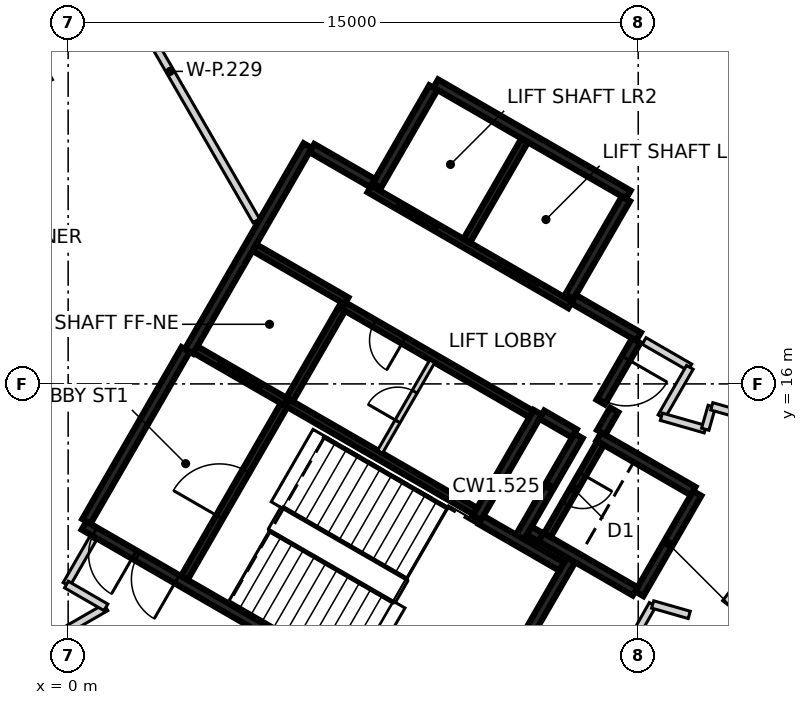
"""IFC4 building model, lengths in metres.
Left out: names, types, materials, properties, quantities, classifications, styles, units other than length and angle.
Written with IfcOpenShell. Run it as: python <this file> out.ifc"""

import sys

from ifc_helpers import new_model, si_unit, direction, frame, frame_2d, origin, place, context, subcontext, project, spatial, rectangle, extrude, element, fill, save


model = new_model("IFC4")
c1 = context("Model", 3, precision=1e-05, world=origin(), true_north=direction((0.0, 1.0)))
c2 = subcontext(c1, "Body", "Model", "MODEL_VIEW")
j1 = project(units=[si_unit("LENGTHUNIT", "METRE"), si_unit("PLANEANGLEUNIT", "RADIAN")], contexts=[c1])
p1 = place(None, origin())
s1 = spatial("IfcSite", under=j1, at=p1, CompositionType="ELEMENT")
p2 = place(p1, origin())
s2 = spatial("IfcBuilding", under=s1, at=p2, CompositionType="ELEMENT")
p3 = place(p2, frame((0.0, 0.0, 60.2)))
s3 = spatial("IfcBuildingStorey", under=s2, at=p3, CompositionType="ELEMENT", Elevation=60.2)
p4 = place(p3, frame((10.42, 6.498, 0.0), z_axis=(0.0, 0.0, 1.0), x_axis=(-0.866021906294, 0.500006057782, 0.0)))
e1 = element("IfcWall", 1, at=p4, inside=s3, PredefinedType="SHEAR", context=c2, shape_type="SweptSolid", body=[
    extrude(rectangle(XDim=11.55, YDim=0.25, at=frame_2d((5.775, 0.0))), origin(), (0.0, 0.0, 1.0), 3.125),
])
p5 = place(p4, frame((10.025, 0.0, 0.0)))
e2 = element("IfcOpeningElement", 2, at=p5, cuts=e1, PredefinedType="OPENING", context=c2, shape_type="SweptSolid", body=[
    extrude(rectangle(XDim=1.2, YDim=2.1, at=frame_2d((0.6, 1.05))), frame((0.0, 0.135, 0.0), z_axis=(0.0, -1.0, 0.0), x_axis=(1.0, 0.0, 0.0)), (0.0, 0.0, 1.0), 0.27),
])
p6 = place(p4, frame((8.725, 0.0, 0.0)))
e3 = element("IfcOpeningElement", 3, at=p6, cuts=e1, PredefinedType="OPENING", context=c2, shape_type="SweptSolid", body=[
    extrude(rectangle(XDim=1.2, YDim=2.1, at=frame_2d((0.6, 1.05))), frame((0.0, 0.135, 0.0), z_axis=(0.0, -1.0, 0.0), x_axis=(1.0, 0.0, 0.0)), (0.0, 0.0, 1.0), 0.27),
])
p7 = place(p3, frame((3.179, 16.856, 0.0), z_axis=(0.0, 0.0, 1.0), x_axis=(0.500004234368, 0.866022959057, 0.0)))
e4 = element("IfcWall", 4, at=p7, inside=s3, PredefinedType="SHEAR", context=c2, shape_type="SweptSolid", body=[
    extrude(rectangle(XDim=6.25, YDim=0.25, at=frame_2d((3.125, 0.0))), origin(), (0.0, 0.0, 1.0), 3.125),
])
p8 = place(p3, frame((9.673, 23.903, 0.0), z_axis=(0.0, 0.0, 1.0), x_axis=(0.86603616409, -0.499981362141, 0.0)))
e5 = element("IfcWall", 5, at=p8, inside=s3, PredefinedType="SHEAR", context=c2, shape_type="SweptSolid", body=[
    extrude(rectangle(XDim=5.85, YDim=0.25, at=frame_2d((2.925, 0.0))), origin(), (0.0, 0.0, 1.0), 3.125),
])
p9 = place(p3, frame((0.48, 12.381, 0.0), z_axis=(0.0, 0.0, 1.0), x_axis=(0.49999885962, 0.866026062182, 0.0)))
e6 = element("IfcWall", 6, at=p9, inside=s3, PredefinedType="SHEAR", context=c2, shape_type="SweptSolid", body=[
    extrude(rectangle(XDim=5.225, YDim=0.25, at=frame_2d((2.612, 0.0))), origin(), (0.0, 0.0, 1.0), 3.125),
])
p10 = place(p3, frame((13.238, 11.378, 0.0), z_axis=(0.0, 0.0, 1.0), x_axis=(-0.500008851346, -0.866020293397, 0.0)))
e7 = element("IfcWall", 7, at=p10, inside=s3, PredefinedType="SHEAR", context=c2, shape_type="SweptSolid", body=[
    extrude(rectangle(XDim=5.51, YDim=0.25, at=frame_2d((2.755, 0.0))), origin(), (0.0, 0.0, 1.0), 3.125),
])
p11 = place(p3, frame((12.357, 15.252, 0.0), z_axis=(0.0, 0.0, 1.0), x_axis=(-0.500028443584, -0.866008981251, 0.0)))
e8 = element("IfcWall", 8, at=p11, inside=s3, PredefinedType="SHEAR", context=c2, shape_type="SweptSolid", body=[
    extrude(rectangle(XDim=3.2, YDim=0.25, at=frame_2d((1.6, 0.0))), origin(), (0.0, 0.0, 1.0), 3.125),
])
for number, where, z_axis, x_axis in (
    (9, (8.123, 21.219, 0.0), (0.0, 0.0, 1.0), (0.5, 0.866, 0.0)),
    (10, (14.676, 20.87, 0.0), (0.0, 0.0, 1.0), (-0.5, -0.866, 0.0)),
):
    element("IfcWall", number, at=place(p3, frame(where, z_axis=z_axis, x_axis=x_axis)), inside=s3, PredefinedType="SHEAR", context=c2, shape_type="SweptSolid", body=[
        extrude(rectangle(XDim=2.975, YDim=0.25, at=frame_2d((1.487, 0.0))), origin(), (0.0, 0.0, 1.0), 3.125),
    ])
p12 = place(p3, frame((16.552, 13.119, 0.0), z_axis=(0.0, 0.0, 1.0), x_axis=(-0.499978833458, -0.866037623948, 0.0)))
e11 = element("IfcWall", 11, at=p12, inside=s3, PredefinedType="SHEAR", context=c2, shape_type="SweptSolid", body=[
    extrude(rectangle(XDim=3.05, YDim=0.25, at=frame_2d((1.525, 0.0))), origin(), (0.0, 0.0, 1.0), 3.125),
])
p13 = place(p3, frame((14.918, 10.54, 0.0), z_axis=(0.0, 0.0, 1.0), x_axis=(-0.866063538972, 0.499933942099, 0.0)))
e12 = element("IfcWall", 12, at=p13, inside=s3, PredefinedType="SHEAR", context=c2, shape_type="SweptSolid", body=[
    extrude(rectangle(XDim=2.865, YDim=0.25, at=frame_2d((1.432, 0.0))), origin(), (0.0, 0.0, 1.0), 3.125),
])
p14 = place(p3, frame((13.963, 14.614, 0.0), z_axis=(0.0, 0.0, 1.0), x_axis=(0.866042235819, -0.499970844928, 0.0)))
e13 = element("IfcWall", 13, at=p14, inside=s3, PredefinedType="SHEAR", context=c2, shape_type="SweptSolid", body=[
    extrude(rectangle(XDim=2.865, YDim=0.25, at=frame_2d((1.432, 0.0))), origin(), (0.0, 0.0, 1.0), 3.125),
])
p15 = place(p3, frame((11.888, 11.961, 0.0), z_axis=(0.0, 0.0, 1.0), x_axis=(0.500003324108, 0.866023484601, 0.0)))
e14 = element("IfcWall", 14, at=p15, inside=s3, PredefinedType="SHEAR", context=c2, shape_type="SweptSolid", body=[
    extrude(rectangle(XDim=3.085, YDim=0.25, at=frame_2d((1.542, 0.0))), origin(), (0.0, 0.0, 1.0), 3.125),
])
p16 = place(p3, frame((10.865, 12.418, 0.0), z_axis=(0.0, 0.0, 1.0), x_axis=(0.866026229868, -0.499998569178, 0.0)))
e15 = element("IfcWall", 15, at=p16, inside=s3, PredefinedType="SHEAR", context=c2, shape_type="SweptSolid", body=[
    extrude(rectangle(XDim=2.449, YDim=0.25, at=frame_2d((1.225, 0.0))), origin(), (0.0, 0.0, 1.0), 3.125),
])
p17 = place(p3, frame((13.297, 18.231, 0.0), z_axis=(0.0, 0.0, 1.0), x_axis=(0.866043531843, -0.499968599967, 0.0)))
e16 = element("IfcWall", 16, at=p17, inside=s3, PredefinedType="SHEAR", context=c2, shape_type="SweptSolid", body=[
    extrude(rectangle(XDim=1.975, YDim=0.25, at=frame_2d((0.987, 0.0))), origin(), (0.0, 0.0, 1.0), 3.125),
])
p18 = place(p3, frame((6.413, 22.206, 0.0), z_axis=(0.0, 0.0, 1.0), x_axis=(0.866016279763, -0.500015802937, 0.0)))
e17 = element("IfcWall", 17, at=p18, inside=s3, PredefinedType="SHEAR", context=c2, shape_type="SweptSolid", body=[
    extrude(rectangle(XDim=1.849, YDim=0.25, at=frame_2d((0.925, 0.0))), origin(), (0.0, 0.0, 1.0), 3.125),
])
p19 = place(p3, frame((14.945, 17.135, 0.0), z_axis=(0.0, 0.0, 1.0), x_axis=(-0.499983108224, -0.866035156036, 0.0)))
e18 = element("IfcWall", 18, at=p19, inside=s3, PredefinedType="SHEAR", context=c2, shape_type="SweptSolid", body=[
    extrude(rectangle(XDim=1.865, YDim=0.25, at=frame_2d((0.932, 0.0))), origin(), (0.0, 0.0, 1.0), 3.125),
])
p20 = place(p19, frame((0.535, 0.0, 0.0)))
e19 = element("IfcOpeningElement", 19, at=p20, cuts=e18, PredefinedType="OPENING", context=c2, shape_type="SweptSolid", body=[
    extrude(rectangle(XDim=1.25, YDim=2.1, at=frame_2d((0.625, 1.05))), frame((0.0, 0.135, 0.0), z_axis=(0.0, -1.0, 0.0), x_axis=(1.0, 0.0, 0.0)), (0.0, 0.0, 1.0), 0.27),
])
p21 = place(p3, frame((13.322, 14.695, 0.0), z_axis=(0.0, 0.0, 1.0), x_axis=(-0.866017078145, 0.500014420154, 0.0)))
e20 = element("IfcWall", 20, at=p21, inside=s3, PredefinedType="SHEAR", context=c2, shape_type="SweptSolid", body=[
    extrude(rectangle(XDim=0.989, YDim=0.25, at=frame_2d((0.495, 0.0))), origin(), (0.0, 0.0, 1.0), 3.125),
])
p22 = place(p3, frame((14.368, 15.315, 0.0), z_axis=(0.0, 0.0, 1.0), x_axis=(-0.499897359611, -0.866084655132, 0.0)))
e21 = element("IfcWall", 21, at=p22, inside=s3, PredefinedType="SHEAR", context=c2, shape_type="SweptSolid", body=[
    extrude(rectangle(XDim=0.685, YDim=0.25, at=frame_2d((0.342, 0.0))), origin(), (0.0, 0.0, 1.0), 3.125),
])
p23 = place(p3, frame((12.433, 11.964, 0.0), z_axis=(0.0, 0.0, 1.0), x_axis=(-0.866055875208, 0.499947218231, 0.0)))
e22 = element("IfcWall", 22, at=p23, inside=s3, PredefinedType="SHEAR", context=c2, shape_type="SweptSolid", body=[
    extrude(rectangle(XDim=0.345, YDim=0.25, at=frame_2d((0.172, 0.0))), origin(), (0.0, 0.0, 1.0), 3.125),
])
p24 = place(p3, frame((13.21, 18.08, 0.0), z_axis=(0.0, 0.0, 1.0), x_axis=(-0.866030299012, 0.499991521122, 0.0)))
e23 = element("IfcWall", 23, at=p24, inside=s3, PredefinedType="SHEAR", context=c2, shape_type="SweptSolid", body=[
    extrude(rectangle(XDim=6.1, YDim=0.2, at=frame_2d((3.05, 0.0))), origin(), (0.0, 0.0, 1.0), 3.125),
])
p25 = place(p24, frame((1.0, 0.0, 0.0)))
e24 = element("IfcOpeningElement", 24, at=p25, cuts=e23, PredefinedType="OPENING", context=c2, shape_type="SweptSolid", body=[
    extrude(rectangle(XDim=1.2, YDim=2.1, at=frame_2d((0.6, 1.05))), frame((0.0, 0.11, 0.0), z_axis=(0.0, -1.0, 0.0), x_axis=(1.0, 0.0, 0.0)), (0.0, 0.0, 1.0), 0.22),
])
p26 = place(p24, frame((4.05, 0.0, 0.0)))
e25 = element("IfcOpeningElement", 25, at=p26, cuts=e23, PredefinedType="OPENING", context=c2, shape_type="SweptSolid", body=[
    extrude(rectangle(XDim=1.2, YDim=2.1, at=frame_2d((0.6, 1.05))), frame((0.0, 0.11, 0.0), z_axis=(0.0, -1.0, 0.0), x_axis=(1.0, 0.0, 0.0)), (0.0, 0.0, 1.0), 0.22),
])
p27 = place(p3, frame((5.775, 15.502, 0.0), z_axis=(0.0, 0.0, 1.0), x_axis=(0.866020080793, -0.500009219579, 0.0)))
e26 = element("IfcWall", 26, at=p27, inside=s3, PredefinedType="SHEAR", context=c2, shape_type="SweptSolid", body=[
    extrude(rectangle(XDim=5.699, YDim=0.2, at=frame_2d((2.85, 0.0))), origin(), (0.0, 0.0, 1.0), 3.125),
])
p28 = place(p3, frame((12.185, 15.207, 0.0), z_axis=(0.0, 0.0, 1.0), x_axis=(-0.866020080793, 0.500009219579, 0.0)))
e27 = element("IfcWall", 27, at=p28, inside=s3, PredefinedType="SHEAR", context=c2, shape_type="SweptSolid", body=[
    extrude(rectangle(XDim=5.699, YDim=0.2, at=frame_2d((2.85, 0.0))), origin(), (0.0, 0.0, 1.0), 3.125),
])
p29 = place(p28, frame((3.874, 0.0, 0.0)))
e28 = element("IfcOpeningElement", 28, at=p29, cuts=e27, PredefinedType="OPENING", context=c2, shape_type="SweptSolid", body=[
    extrude(rectangle(XDim=0.9, YDim=2.1, at=frame_2d((0.45, 1.05))), frame((0.0, 0.11, 0.0), z_axis=(0.0, -1.0, 0.0), x_axis=(1.0, 0.0, 0.0)), (0.0, 0.0, 1.0), 0.22),
])
p30 = place(p3, frame((3.057, 10.895, 0.0), z_axis=(0.0, 0.0, 1.0), x_axis=(0.499989418164, 0.866031513124, 0.0)))
e29 = element("IfcWall", 29, at=p30, inside=s3, PredefinedType="SHEAR", context=c2, shape_type="SweptSolid", body=[
    extrude(rectangle(XDim=5.251, YDim=0.2, at=frame_2d((2.625, 0.0))), origin(), (0.0, 0.0, 1.0), 3.125),
])
p31 = place(p30, frame((1.849, 0.0, 0.0)))
e30 = element("IfcOpeningElement", 30, at=p31, cuts=e29, PredefinedType="OPENING", context=c2, shape_type="SweptSolid", body=[
    extrude(rectangle(XDim=1.4, YDim=2.1, at=frame_2d((0.7, 1.05))), frame((0.0, 0.11, 0.0), z_axis=(0.0, -1.0, 0.0), x_axis=(1.0, 0.0, 0.0)), (0.0, 0.0, 1.0), 0.22),
])
p32 = place(p3, frame((10.489, 19.767, 0.0), z_axis=(0.0, 0.0, 1.0), x_axis=(0.499946628782, 0.866056215479, 0.0)))
e31 = element("IfcWall", 31, at=p32, inside=s3, PredefinedType="SHEAR", context=c2, shape_type="SweptSolid", body=[
    extrude(rectangle(XDim=3.048, YDim=0.2, at=frame_2d((1.524, 0.0))), origin(), (0.0, 0.0, 1.0), 3.125),
])
p33 = place(p3, frame((14.008, 14.442, 0.0), z_axis=(0.0, 0.0, 1.0), x_axis=(-0.499986818241, -0.866033014143, 0.0)))
e32 = element("IfcWall", 32, at=p33, inside=s3, PredefinedType="SHEAR", context=c2, shape_type="SweptSolid", body=[
    extrude(rectangle(XDim=2.798, YDim=0.2, at=frame_2d((1.399, 0.0))), origin(), (0.0, 0.0, 1.0), 3.125),
])
p34 = place(p33, frame((0.949, 0.0, 0.0)))
e33 = element("IfcOpeningElement", 33, at=p34, cuts=e32, PredefinedType="OPENING", context=c2, shape_type="SweptSolid", body=[
    extrude(rectangle(XDim=0.9, YDim=2.1, at=frame_2d((0.45, 1.05))), frame((0.0, 0.11, 0.0), z_axis=(0.0, -1.0, 0.0), x_axis=(1.0, 0.0, 0.0)), (0.0, 0.0, 1.0), 0.22),
])
p35 = place(p3, frame((7.199, 17.97, 0.0), z_axis=(0.0, 0.0, 1.0), x_axis=(-0.499968400327, -0.866043647095, 0.0)))
e34 = element("IfcWall", 34, at=p35, inside=s3, PredefinedType="SHEAR", context=c2, shape_type="SweptSolid", body=[
    extrude(rectangle(XDim=2.75, YDim=0.2, at=frame_2d((1.375, 0.0))), origin(), (0.0, 0.0, 1.0), 3.125),
])
p36 = place(p3, frame((5.725, 15.531, 0.0), z_axis=(0.0, 0.0, 1.0), x_axis=(-0.866037306777, 0.499979382845, 0.0)))
e35 = element("IfcWall", 35, at=p36, inside=s3, PredefinedType="SHEAR", context=c2, shape_type="SweptSolid", body=[
    extrude(rectangle(XDim=2.742, YDim=0.2, at=frame_2d((1.371, 0.0))), origin(), (0.0, 0.0, 1.0), 3.125),
])
p37 = place(p36, frame((0.743, 0.0, 0.0)))
e36 = element("IfcOpeningElement", 36, at=p37, cuts=e35, PredefinedType="OPENING", context=c2, shape_type="SweptSolid", body=[
    extrude(rectangle(XDim=1.3, YDim=2.1, at=frame_2d((0.65, 1.05))), frame((0.0, 0.11, 0.0), z_axis=(0.0, -1.0, 0.0), x_axis=(1.0, 0.0, 0.0)), (0.0, 0.0, 1.0), 0.22),
])
p38 = place(p3, frame((4.901, 19.586, 0.0), z_axis=(0.0, 0.0, 1.0), x_axis=(0.866022890907, -0.500004352405, 0.0)))
e37 = element("IfcWall", 37, at=p38, inside=s3, PredefinedType="SHEAR", context=c2, shape_type="SweptSolid", body=[
    extrude(rectangle(XDim=2.799, YDim=0.2, at=frame_2d((1.399, 0.0))), origin(), (0.0, 0.0, 1.0), 3.125),
])
p39 = place(p3, frame((8.207, 14.214, 0.0), z_axis=(0.0, 0.0, 1.0), x_axis=(0.499922376475, 0.866070215109, 0.0)))
e38 = element("IfcWall", 38, at=p39, inside=s3, PredefinedType="PARTITIONING", context=c2, shape_type="SweptSolid", body=[
    extrude(rectangle(XDim=2.749, YDim=0.15, at=frame_2d((1.374, 0.0))), origin(), (0.0, 0.0, 1.0), 3.125),
])
p40 = place(p39, frame((0.924, 0.0, 0.0)))
e39 = element("IfcOpeningElement", 39, at=p40, cuts=e38, PredefinedType="OPENING", context=c2, shape_type="SweptSolid", body=[
    extrude(rectangle(XDim=0.9, YDim=2.1, at=frame_2d((0.45, 1.05))), frame((0.0, 0.085, 0.0), z_axis=(0.0, -1.0, 0.0), x_axis=(1.0, 0.0, 0.0)), (0.0, 0.0, 1.0), 0.17),
])
p41 = place(p3, frame((-0.045, 9.522, 0.0), z_axis=(0.0, 0.0, 1.0), x_axis=(0.86625675314, 0.499599076899, 0.0)))
e40 = element("IfcWall", 40, at=p41, inside=s3, PredefinedType="PARTITIONING", context=c2, shape_type="SweptSolid", body=[
    extrude(rectangle(XDim=1.199, YDim=0.2, at=frame_2d((0.6, 0.0))), origin(), (0.0, 0.0, 1.0), 3.125),
])
p42 = place(p3, frame((-0.045, 10.722, 0.0), z_axis=(0.0, 0.0, 1.0), x_axis=(0.500107785535, 0.865963164833, 0.0)))
e41 = element("IfcWall", 41, at=p42, inside=s3, PredefinedType="PARTITIONING", context=c2, shape_type="SweptSolid", body=[
    extrude(rectangle(XDim=1.389, YDim=0.2, at=frame_2d((0.695, 0.0))), origin(), (0.0, 0.0, 1.0), 3.125),
])
p43 = place(p3, frame((-0.045, 10.721, 0.0), z_axis=(0.0, 0.0, 1.0), x_axis=(0.865992388649, -0.500057179532, 0.0)))
e42 = element("IfcWall", 42, at=p43, inside=s3, PredefinedType="PARTITIONING", context=c2, shape_type="SweptSolid", body=[
    extrude(rectangle(XDim=1.199, YDim=0.2, at=frame_2d((0.6, 0.0))), origin(), (0.0, 0.0, 1.0), 3.125),
])
p44 = place(p3, frame((12.433, 4.992, 0.0), z_axis=(0.0, 0.0, 1.0), x_axis=(0.492583054982, 0.870265438786, 0.0)))
e43 = element("IfcWall", 43, at=p44, inside=s3, PredefinedType="PARTITIONING", context=c2, shape_type="SweptSolid", body=[
    extrude(rectangle(XDim=5.981, YDim=0.2, at=frame_2d((2.991, 0.0))), origin(), (0.0, 0.0, 1.0), 3.125),
])
p45 = place(p44, frame((3.469, 0.0, 0.0)))
e44 = element("IfcOpeningElement", 44, at=p45, cuts=e43, PredefinedType="OPENING", context=c2, shape_type="SweptSolid", body=[
    extrude(rectangle(XDim=1.0, YDim=2.1, at=frame_2d((0.5, 1.05))), frame((0.0, 0.11, 0.0), z_axis=(0.0, -1.0, 0.0), x_axis=(1.0, 0.0, 0.0)), (0.0, 0.0, 1.0), 0.22),
])
p46 = place(p3, frame((15.156, 17.13, 0.0), z_axis=(0.0, 0.0, 1.0), x_axis=(0.865755062894, -0.500467952093, 0.0)))
e45 = element("IfcWall", 45, at=p46, inside=s3, PredefinedType="PARTITIONING", context=c2, shape_type="SweptSolid", body=[
    extrude(rectangle(XDim=1.389, YDim=0.2, at=frame_2d((0.694, 0.0))), origin(), (0.0, 0.0, 1.0), 3.125),
])
p47 = place(p3, frame((15.38, 10.197, 0.0), z_axis=(0.0, 0.0, 1.0), x_axis=(0.961523947641, -0.274721127897, 0.0)))
e46 = element("IfcWall", 46, at=p47, inside=s3, PredefinedType="PARTITIONING", context=c2, shape_type="SweptSolid", body=[
    extrude(rectangle(XDim=1.001, YDim=0.2, at=frame_2d((0.5, 0.0))), origin(), (0.0, 0.0, 1.0), 3.125),
])
p48 = place(p3, frame((15.609, 15.136, 0.0), z_axis=(0.0, 0.0, 1.0), x_axis=(0.499501622561, 0.866312950993, 0.0)))
e47 = element("IfcWall", 47, at=p48, inside=s3, PredefinedType="PARTITIONING", context=c2, shape_type="SweptSolid", body=[
    extrude(rectangle(XDim=1.5, YDim=0.2, at=frame_2d((0.75, 0.0))), origin(), (0.0, 0.0, 1.0), 3.125),
])
p49 = place(p3, frame((15.609, 15.136, 0.0), z_axis=(0.0, 0.0, 1.0), x_axis=(0.961662011825, -0.274237442763, 0.0)))
e48 = element("IfcWall", 48, at=p49, inside=s3, PredefinedType="PARTITIONING", context=c2, shape_type="SweptSolid", body=[
    extrude(rectangle(XDim=1.2, YDim=0.2, at=frame_2d((0.6, 0.0))), origin(), (0.0, 0.0, 1.0), 3.125),
])
p50 = place(p3, frame((16.763, 14.807, 0.0), z_axis=(0.0, 0.0, 1.0), x_axis=(0.274464026122, 0.961597368115, 0.0)))
e49 = element("IfcWall", 49, at=p50, inside=s3, PredefinedType="PARTITIONING", context=c2, shape_type="SweptSolid", body=[
    extrude(rectangle(XDim=0.627, YDim=0.2, at=frame_2d((0.313, 0.0))), origin(), (0.0, 0.0, 1.0), 3.125),
])
p51 = place(p3, frame((16.935, 15.41, 0.0), z_axis=(0.0, 0.0, 1.0), x_axis=(0.961602664273, -0.274445470107, 0.0)))
e50 = element("IfcWall", 50, at=p51, inside=s3, PredefinedType="PARTITIONING", context=c2, shape_type="SweptSolid", body=[
    extrude(rectangle(XDim=0.936, YDim=0.2, at=frame_2d((0.468, 0.0))), origin(), (0.0, 0.0, 1.0), 3.125),
])
p52 = place(p3, frame((17.299, 10.235, 0.0), z_axis=(0.0, 0.0, 1.0), x_axis=(0.61377461522, 0.789481299153, 0.0)))
e51 = element("IfcWall", 51, at=p52, inside=s3, PredefinedType="PARTITIONING", context=c2, shape_type="SweptSolid", body=[
    extrude(rectangle(XDim=2.851, YDim=0.2, at=frame_2d((1.426, 0.0))), origin(), (0.0, 0.0, 1.0), 3.125),
])
p53 = place(p3, frame((0.412, 28.153, 0.0), z_axis=(0.0, 0.0, 1.0), x_axis=(0.500039143415, -0.866002803143, 0.0)))
e52 = element("IfcWall", 52, at=p53, inside=s3, PredefinedType="PARTITIONING", context=c2, shape_type="SweptSolid", body=[
    extrude(rectangle(XDim=9.075, YDim=0.2, at=frame_2d((4.538, 0.0))), origin(), (0.0, 0.0, 1.0), 2.225),
])
p54 = place(p37, origin())
e53 = element("IfcDoor", 53, at=p54, inside=s3, OperationType="SLIDING_TO_LEFT", PredefinedType="DOOR", context=c2, shape_type="SweptSolid", body=[
    extrude(rectangle(XDim=1.3, YDim=2.1, at=frame_2d((0.65, 1.05))), frame((0.0, 0.025, 0.0), z_axis=(0.0, -1.0, 0.0), x_axis=(1.0, 0.0, 0.0)), (0.0, 0.0, 1.0), 0.05),
])
fill(e36, e53)
p55 = place(p25, origin())
e54 = element("IfcDoor", 54, at=p55, inside=s3, OperationType="DOUBLE_DOOR_SLIDING", PredefinedType="DOOR", context=c2, shape_type="SweptSolid", body=[
    extrude(rectangle(XDim=1.2, YDim=2.1, at=frame_2d((0.6, 1.05))), frame((0.0, 0.025, 0.0), z_axis=(0.0, -1.0, 0.0), x_axis=(1.0, 0.0, 0.0)), (0.0, 0.0, 1.0), 0.05),
])
fill(e24, e54)
p56 = place(p26, origin())
e55 = element("IfcDoor", 55, at=p56, inside=s3, OperationType="DOUBLE_DOOR_SLIDING", PredefinedType="DOOR", context=c2, shape_type="SweptSolid", body=[
    extrude(rectangle(XDim=1.2, YDim=2.1, at=frame_2d((0.6, 1.05))), frame((0.0, 0.025, 0.0), z_axis=(0.0, -1.0, 0.0), x_axis=(1.0, 0.0, 0.0)), (0.0, 0.0, 1.0), 0.05),
])
fill(e25, e55)
p57 = place(p20, origin())
e56 = element("IfcDoor", 56, at=p57, inside=s3, OperationType="SINGLE_SWING_LEFT", PredefinedType="DOOR", context=c2, shape_type="SweptSolid", body=[
    extrude(rectangle(XDim=1.25, YDim=2.1, at=frame_2d((0.625, 1.05))), frame((0.0, 0.025, 0.0), z_axis=(0.0, -1.0, 0.0), x_axis=(1.0, 0.0, 0.0)), (0.0, 0.0, 1.0), 0.05),
])
fill(e19, e56)
p58 = place(p5, origin())
e57 = element("IfcDoor", 57, at=p58, inside=s3, OperationType="SINGLE_SWING_LEFT", PredefinedType="DOOR", context=c2, shape_type="SweptSolid", body=[
    extrude(rectangle(XDim=1.2, YDim=2.1, at=frame_2d((0.6, 1.05))), frame((0.0, 0.025, 0.0), z_axis=(0.0, -1.0, 0.0), x_axis=(1.0, 0.0, 0.0)), (0.0, 0.0, 1.0), 0.05),
])
fill(e2, e57)
p59 = place(p6, origin())
e58 = element("IfcDoor", 58, at=p59, inside=s3, OperationType="SINGLE_SWING_RIGHT", PredefinedType="DOOR", context=c2, shape_type="SweptSolid", body=[
    extrude(rectangle(XDim=1.2, YDim=2.1, at=frame_2d((0.6, 1.05))), frame((0.0, 0.025, 0.0), z_axis=(0.0, -1.0, 0.0), x_axis=(1.0, 0.0, 0.0)), (0.0, 0.0, 1.0), 0.05),
])
fill(e3, e58)
p60 = place(p31, origin())
e59 = element("IfcDoor", 59, at=p60, inside=s3, OperationType="SINGLE_SWING_LEFT", PredefinedType="DOOR", context=c2, shape_type="SweptSolid", body=[
    extrude(rectangle(XDim=1.4, YDim=2.1, at=frame_2d((0.7, 1.05))), frame((0.0, 0.025, 0.0), z_axis=(0.0, -1.0, 0.0), x_axis=(1.0, 0.0, 0.0)), (0.0, 0.0, 1.0), 0.05),
])
fill(e30, e59)
p61 = place(p29, origin())
e60 = element("IfcDoor", 60, at=p61, inside=s3, OperationType="SINGLE_SWING_RIGHT", PredefinedType="DOOR", context=c2, shape_type="SweptSolid", body=[
    extrude(rectangle(XDim=0.9, YDim=2.1, at=frame_2d((0.45, 1.05))), frame((0.0, 0.025, 0.0), z_axis=(0.0, -1.0, 0.0), x_axis=(1.0, 0.0, 0.0)), (0.0, 0.0, 1.0), 0.05),
])
fill(e28, e60)
p62 = place(p34, origin())
e61 = element("IfcDoor", 61, at=p62, inside=s3, OperationType="SINGLE_SWING_LEFT", PredefinedType="DOOR", context=c2, shape_type="SweptSolid", body=[
    extrude(rectangle(XDim=0.9, YDim=2.1, at=frame_2d((0.45, 1.05))), frame((0.0, 0.025, 0.0), z_axis=(0.0, -1.0, 0.0), x_axis=(1.0, 0.0, 0.0)), (0.0, 0.0, 1.0), 0.05),
])
fill(e33, e61)
p63 = place(p40, origin())
e62 = element("IfcDoor", 62, at=p63, inside=s3, OperationType="SINGLE_SWING_RIGHT", PredefinedType="DOOR", context=c2, shape_type="SweptSolid", body=[
    extrude(rectangle(XDim=0.9, YDim=2.1, at=frame_2d((0.45, 1.05))), frame((0.0, 0.025, 0.0), z_axis=(0.0, -1.0, 0.0), x_axis=(1.0, 0.0, 0.0)), (0.0, 0.0, 1.0), 0.05),
])
fill(e39, e62)
save(model, sys.argv[1])
